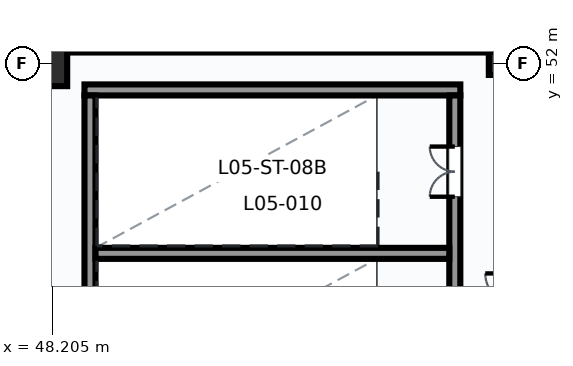
"""IFC4 building model, lengths in metres.
Left out: names, types, materials, properties, quantities, classifications, styles, units other than length and angle.
Written with IfcOpenShell. Run it as: python <this file> out.ifc"""

import sys

from ifc_helpers import new_model, si_unit, direction, frame, frame_2d, origin, origin_2d, place, context, subcontext, project, spatial, rectangle, hollow_circle, extrude, element, fill, save


model = new_model("IFC4")
c1 = context("Model", 3, precision=1e-05, world=origin(), true_north=direction((0.0, 1.0)))
c2 = subcontext(c1, "Body", "Model", "MODEL_VIEW")
j1 = project(units=[si_unit("LENGTHUNIT", "METRE"), si_unit("PLANEANGLEUNIT", "RADIAN")], contexts=[c1])
p1 = place(None, origin())
s1 = spatial("IfcSite", under=j1, at=p1, CompositionType="ELEMENT")
p2 = place(p1, origin())
s2 = spatial("IfcBuilding", under=s1, at=p2, CompositionType="ELEMENT")
p3 = place(p2, frame((0.0, 0.0, 24.6)))
s3 = spatial("IfcBuildingStorey", under=s2, at=p3, CompositionType="ELEMENT", Elevation=24.6)
p4 = place(p3, frame((48.0, 52.0, 0.0), z_axis=(0.0, 0.0, 1.0), x_axis=(1.0, 0.0, 0.0)))
e1 = element("IfcColumn", 1, at=p4, inside=s3, PredefinedType="COLUMN", context=c2, shape_type="SweptSolid", body=[
    extrude(rectangle(XDim=1.2, YDim=1.2, at=origin_2d()), origin(), (0.0, 0.0, 1.0), 4.8),
])
p5 = place(p3, frame((60.0, 52.0, 0.0), z_axis=(0.0, 0.0, 1.0), x_axis=(1.0, 0.0, 0.0)))
e2 = element("IfcColumn", 2, at=p5, inside=s3, PredefinedType="COLUMN", context=c2, shape_type="SweptSolid", body=[
    extrude(hollow_circle(Radius=0.305, WallThickness=0.025, at=origin_2d()), origin(), (0.0, 0.0, 1.0), 4.8),
])
p6 = place(p3, frame((49.055, 51.3, 0.0), z_axis=(0.0, 0.0, 1.0), x_axis=(1.0, 0.0, 0.0)))
e3 = element("IfcWall", 3, at=p6, inside=s3, PredefinedType="SHEAR", context=c2, shape_type="SweptSolid", body=[
    extrude(rectangle(XDim=9.89, YDim=0.29, at=frame_2d((4.945, 0.0))), origin(), (0.0, 0.0, 1.0), 4.8),
])
p7 = place(p3, frame((49.2, 42.845, 0.0), z_axis=(0.0, 0.0, 1.0), x_axis=(0.0, 1.0, 0.0)))
e4 = element("IfcWall", 4, at=p7, inside=s3, PredefinedType="SHEAR", context=c2, shape_type="SweptSolid", body=[
    extrude(rectangle(XDim=8.31, YDim=0.29, at=frame_2d((4.155, 0.0))), origin(), (0.0, 0.0, 1.0), 4.8),
])
p8 = place(p3, frame((58.8, 42.845, 0.0), z_axis=(0.0, 0.0, 1.0), x_axis=(0.0, 1.0, 0.0)))
e5 = element("IfcWall", 5, at=p8, inside=s3, PredefinedType="SHEAR", context=c2, shape_type="SweptSolid", body=[
    extrude(rectangle(XDim=8.31, YDim=0.29, at=frame_2d((4.155, 0.0))), origin(), (0.0, 0.0, 1.0), 4.8),
])
p9 = place(p8, frame((1.305, 0.0, 0.0)))
e6 = element("IfcOpeningElement", 6, at=p9, cuts=e5, PredefinedType="OPENING", context=c2, shape_type="SweptSolid", body=[
    extrude(rectangle(XDim=1.4, YDim=2.2, at=frame_2d((0.7, 1.1))), frame((0.0, 0.155, 0.0), z_axis=(0.0, -1.0, 0.0), x_axis=(1.0, 0.0, 0.0)), (0.0, 0.0, 1.0), 0.31),
])
p10 = place(p8, frame((5.645, 0.0, 0.0)))
e7 = element("IfcOpeningElement", 7, at=p10, cuts=e5, PredefinedType="OPENING", context=c2, shape_type="SweptSolid", body=[
    extrude(rectangle(XDim=1.32, YDim=2.2, at=frame_2d((0.66, 1.1))), frame((0.0, 0.155, 0.0), z_axis=(0.0, -1.0, 0.0), x_axis=(1.0, 0.0, 0.0)), (0.0, 0.0, 1.0), 0.31),
])
p11 = place(p3, frame((49.345, 47.0, 0.0), z_axis=(0.0, 0.0, 1.0), x_axis=(1.0, 0.0, 0.0)))
e8 = element("IfcWall", 8, at=p11, inside=s3, PredefinedType="SHEAR", context=c2, shape_type="SweptSolid", body=[
    extrude(rectangle(XDim=9.31, YDim=0.29, at=frame_2d((4.655, 0.0))), origin(), (0.0, 0.0, 1.0), 4.8),
])
p12 = place(p3, frame((73.0, 52.4, 0.0), z_axis=(0.0, 0.0, 1.0), x_axis=(-1.0, 0.0, 0.0)))
e9 = element("IfcWall", 9, at=p12, inside=s3, PredefinedType="SOLIDWALL", context=c2, shape_type="SweptSolid", body=[
    extrude(rectangle(XDim=24.4, YDim=0.23, at=frame_2d((12.2, 0.0))), origin(), (0.0, 0.0, 1.0), 4.58),
])
p13 = place(p12, frame((8.822, 0.0, 0.0)))
e10 = element("IfcOpeningElement", 10, at=p13, cuts=e9, PredefinedType="OPENING", context=c2, shape_type="SweptSolid", body=[
    extrude(rectangle(XDim=0.9, YDim=2.1, at=frame_2d((0.45, 1.05))), frame((0.0, 0.125, 0.0), z_axis=(0.0, -1.0, 0.0), x_axis=(1.0, 0.0, 0.0)), (0.0, 0.0, 1.0), 0.25),
])
p14 = place(p10, origin())
e11 = element("IfcDoor", 11, at=p14, inside=s3, OperationType="DOUBLE_DOOR_SINGLE_SWING", PredefinedType="DOOR", context=c2, shape_type="SweptSolid", body=[
    extrude(rectangle(XDim=1.32, YDim=2.2, at=frame_2d((0.66, 1.1))), frame((0.0, 0.025, 0.0), z_axis=(0.0, -1.0, 0.0), x_axis=(1.0, 0.0, 0.0)), (0.0, 0.0, 1.0), 0.05),
])
fill(e7, e11)
save(model, sys.argv[1])
